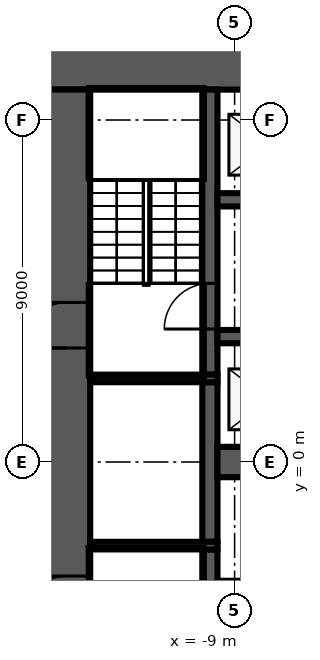
"""IFC4 building model, lengths in metres.
Left out: names, types, materials, properties, quantities, classifications, styles, units other than length and angle.
Written with IfcOpenShell. Run it as: python <this file> out.ifc"""

import sys

from ifc_helpers import new_model, si_unit, direction, frame, frame_2d, origin, place, context, subcontext, project, spatial, rectangle, extrude, element, fill, save


model = new_model("IFC4")
c1 = context("Model", 3, precision=1e-05, world=origin(), true_north=direction((0.0, 1.0)))
c2 = subcontext(c1, "Body", "Model", "MODEL_VIEW")
j1 = project(units=[si_unit("LENGTHUNIT", "METRE"), si_unit("PLANEANGLEUNIT", "RADIAN")], contexts=[c1])
p1 = place(None, origin())
s1 = spatial("IfcSite", under=j1, at=p1, CompositionType="ELEMENT")
p2 = place(p1, origin())
s2 = spatial("IfcBuilding", under=s1, at=p2, CompositionType="ELEMENT")
p3 = place(p2, origin())
s3 = spatial("IfcBuildingStorey", under=s2, at=p3, CompositionType="ELEMENT", Elevation=0.0)
p4 = place(p3, frame((-14.0, 10.4, 0.0), z_axis=(0.0, 0.0, 1.0), x_axis=(1.0, 0.0, 0.0)))
e1 = element("IfcWall", 1, at=p4, inside=s3, PredefinedType="SHEAR", context=c2, shape_type="SweptSolid", body=[
    extrude(rectangle(XDim=28.0, YDim=1.2, at=frame_2d((14.0, 0.0))), origin(), (0.0, 0.0, 1.0), 8.55),
])
p5 = place(p4, frame((15.9, 0.0, 0.0)))
e2 = element("IfcOpeningElement", 2, at=p5, cuts=e1, PredefinedType="OPENING", context=c2, shape_type="SweptSolid", body=[
    extrude(rectangle(XDim=1.6, YDim=2.1, at=frame_2d((0.8, 1.05))), frame((0.0, 0.61, 0.0), z_axis=(0.0, -1.0, 0.0), x_axis=(1.0, 0.0, 0.0)), (0.0, 0.0, 1.0), 1.22),
])
p6 = place(p3, frame((-13.4, -9.8, 0.0), z_axis=(0.0, 0.0, 1.0), x_axis=(0.0, 1.0, 0.0)))
e3 = element("IfcWall", 3, at=p6, inside=s3, PredefinedType="SHEAR", context=c2, shape_type="SweptSolid", body=[
    extrude(rectangle(XDim=19.6, YDim=1.2, at=frame_2d((9.8, 0.0))), origin(), (0.0, 0.0, 1.0), 8.55),
])
p7 = place(p6, frame((12.8, 0.0, 0.0)))
e4 = element("IfcOpeningElement", 4, at=p7, cuts=e3, PredefinedType="OPENING", context=c2, shape_type="SweptSolid", body=[
    extrude(rectangle(XDim=1.2, YDim=2.1, at=frame_2d((0.6, 1.05))), frame((0.0, 0.61, 0.0), z_axis=(0.0, -1.0, 0.0), x_axis=(1.0, 0.0, 0.0)), (0.0, 0.0, 1.0), 1.22),
])
p8 = place(p6, frame((5.6, 0.0, 0.0)))
e5 = element("IfcOpeningElement", 5, at=p8, cuts=e3, PredefinedType="OPENING", context=c2, shape_type="SweptSolid", body=[
    extrude(rectangle(XDim=1.2, YDim=2.1, at=frame_2d((0.6, 1.05))), frame((0.0, 0.61, 0.0), z_axis=(0.0, -1.0, 0.0), x_axis=(1.0, 0.0, 0.0)), (0.0, 0.0, 1.0), 1.22),
])
p9 = place(p3, frame((-9.65, -9.8, 0.0), z_axis=(0.0, 0.0, 1.0), x_axis=(0.0, 1.0, 0.0)))
e6 = element("IfcWall", 6, at=p9, inside=s3, PredefinedType="SHEAR", context=c2, shape_type="SweptSolid", body=[
    extrude(rectangle(XDim=7.5, YDim=0.4, at=frame_2d((3.75, 0.0))), origin(), (0.0, 0.0, 1.0), 8.55),
])
p10 = place(p9, frame((5.1, 0.0, 0.0)))
e7 = element("IfcOpeningElement", 7, at=p10, cuts=e6, PredefinedType="OPENING", context=c2, shape_type="SweptSolid", body=[
    extrude(rectangle(XDim=1.2, YDim=2.1, at=frame_2d((0.6, 1.05))), frame((0.0, 0.21, 0.0), z_axis=(0.0, -1.0, 0.0), x_axis=(1.0, 0.0, 0.0)), (0.0, 0.0, 1.0), 0.42),
])
p11 = place(p3, frame((-9.65, -2.1, 0.0), z_axis=(0.0, 0.0, 1.0), x_axis=(0.0, 1.0, 0.0)))
e8 = element("IfcWall", 8, at=p11, inside=s3, PredefinedType="SHEAR", context=c2, shape_type="SweptSolid", body=[
    extrude(rectangle(XDim=4.2, YDim=0.4, at=frame_2d((2.1, 0.0))), origin(), (0.0, 0.0, 1.0), 8.55),
])
p12 = place(p3, frame((-9.65, 2.3, 0.0), z_axis=(0.0, 0.0, 1.0), x_axis=(0.0, 1.0, 0.0)))
e9 = element("IfcWall", 9, at=p12, inside=s3, PredefinedType="SHEAR", context=c2, shape_type="SweptSolid", body=[
    extrude(rectangle(XDim=7.5, YDim=0.4, at=frame_2d((3.75, 0.0))), origin(), (0.0, 0.0, 1.0), 8.55),
])
p13 = place(p12, frame((1.2, 0.0, 0.0)))
e10 = element("IfcOpeningElement", 10, at=p13, cuts=e9, PredefinedType="OPENING", context=c2, shape_type="SweptSolid", body=[
    extrude(rectangle(XDim=1.2, YDim=2.1, at=frame_2d((0.6, 1.05))), frame((0.0, 0.21, 0.0), z_axis=(0.0, -1.0, 0.0), x_axis=(1.0, 0.0, 0.0)), (0.0, 0.0, 1.0), 0.42),
])
for number, where, z_axis, x_axis in (
    (11, (-9.45, 2.2, 0.0), (0.0, 0.0, 1.0), (-1.0, 0.0, 0.0)),
    (12, (-9.45, -2.2, 0.0), (0.0, 0.0, 1.0), (-1.0, 0.0, 0.0)),
):
    element("IfcWall", number, at=place(p3, frame(where, z_axis=z_axis, x_axis=x_axis)), inside=s3, PredefinedType="SHEAR", context=c2, shape_type="SweptSolid", body=[
        extrude(rectangle(XDim=3.35, YDim=0.2, at=frame_2d((1.675, 0.0))), origin(), (0.0, 0.0, 1.0), 8.55),
    ])
p14 = place(p3, frame((-9.45, 6.9, 0.0), z_axis=(0.0, 0.0, 1.0), x_axis=(1.0, 0.0, 0.0)))
e13 = element("IfcWall", 13, at=p14, inside=s3, PredefinedType="SHEAR", context=c2, shape_type="SweptSolid", body=[
    extrude(rectangle(XDim=18.9, YDim=0.35, at=frame_2d((9.45, 0.0))), origin(), (0.0, 0.0, 1.0), 8.55),
])
p15 = place(p14, frame((0.8, 0.0, 0.0)))
e14 = element("IfcOpeningElement", 14, at=p15, cuts=e13, PredefinedType="OPENING", context=c2, shape_type="SweptSolid", body=[
    extrude(rectangle(XDim=1.1, YDim=2.1, at=frame_2d((0.55, 1.05))), frame((0.0, 0.185, 0.0), z_axis=(0.0, -1.0, 0.0), x_axis=(1.0, 0.0, 0.0)), (0.0, 0.0, 1.0), 0.37),
])
p16 = place(p14, frame((3.5, 0.0, 0.0)))
e15 = element("IfcOpeningElement", 15, at=p16, cuts=e13, PredefinedType="OPENING", context=c2, shape_type="SweptSolid", body=[
    extrude(rectangle(XDim=1.1, YDim=2.1, at=frame_2d((0.55, 1.05))), frame((0.0, 0.185, 0.0), z_axis=(0.0, -1.0, 0.0), x_axis=(1.0, 0.0, 0.0)), (0.0, 0.0, 1.0), 0.37),
])
p17 = place(p14, frame((6.2, 0.0, 0.0)))
e16 = element("IfcOpeningElement", 16, at=p17, cuts=e13, PredefinedType="OPENING", context=c2, shape_type="SweptSolid", body=[
    extrude(rectangle(XDim=1.1, YDim=2.1, at=frame_2d((0.55, 1.05))), frame((0.0, 0.185, 0.0), z_axis=(0.0, -1.0, 0.0), x_axis=(1.0, 0.0, 0.0)), (0.0, 0.0, 1.0), 0.37),
])
p18 = place(p14, frame((8.9, 0.0, 0.0)))
e17 = element("IfcOpeningElement", 17, at=p18, cuts=e13, PredefinedType="OPENING", context=c2, shape_type="SweptSolid", body=[
    extrude(rectangle(XDim=1.1, YDim=2.1, at=frame_2d((0.55, 1.05))), frame((0.0, 0.185, 0.0), z_axis=(0.0, -1.0, 0.0), x_axis=(1.0, 0.0, 0.0)), (0.0, 0.0, 1.0), 0.37),
])
p19 = place(p14, frame((11.55, 0.0, 0.0)))
e18 = element("IfcOpeningElement", 18, at=p19, cuts=e13, PredefinedType="OPENING", context=c2, shape_type="SweptSolid", body=[
    extrude(rectangle(XDim=1.2, YDim=2.1, at=frame_2d((0.6, 1.05))), frame((0.0, 0.185, 0.0), z_axis=(0.0, -1.0, 0.0), x_axis=(1.0, 0.0, 0.0)), (0.0, 0.0, 1.0), 0.37),
])
p20 = place(p14, frame((14.3, 0.0, 0.0)))
e19 = element("IfcOpeningElement", 19, at=p20, cuts=e13, PredefinedType="OPENING", context=c2, shape_type="SweptSolid", body=[
    extrude(rectangle(XDim=1.1, YDim=2.1, at=frame_2d((0.55, 1.05))), frame((0.0, 0.185, 0.0), z_axis=(0.0, -1.0, 0.0), x_axis=(1.0, 0.0, 0.0)), (0.0, 0.0, 1.0), 0.37),
])
p21 = place(p14, frame((17.0, 0.0, 0.0)))
e20 = element("IfcOpeningElement", 20, at=p21, cuts=e13, PredefinedType="OPENING", context=c2, shape_type="SweptSolid", body=[
    extrude(rectangle(XDim=1.1, YDim=2.1, at=frame_2d((0.55, 1.05))), frame((0.0, 0.185, 0.0), z_axis=(0.0, -1.0, 0.0), x_axis=(1.0, 0.0, 0.0)), (0.0, 0.0, 1.0), 0.37),
])
p22 = place(p3, frame((9.45, 3.3, 0.0), z_axis=(0.0, 0.0, 1.0), x_axis=(-1.0, 0.0, 0.0)))
e21 = element("IfcWall", 21, at=p22, inside=s3, PredefinedType="SHEAR", context=c2, shape_type="SweptSolid", body=[
    extrude(rectangle(XDim=18.9, YDim=0.35, at=frame_2d((9.45, 0.0))), origin(), (0.0, 0.0, 1.0), 8.55),
])
p23 = place(p22, frame((0.9, 0.0, 0.0)))
e22 = element("IfcOpeningElement", 22, at=p23, cuts=e21, PredefinedType="OPENING", context=c2, shape_type="SweptSolid", body=[
    extrude(rectangle(XDim=0.9, YDim=2.1, at=frame_2d((0.45, 1.05))), frame((0.0, 0.185, 0.0), z_axis=(0.0, -1.0, 0.0), x_axis=(1.0, 0.0, 0.0)), (0.0, 0.0, 1.0), 0.37),
])
p24 = place(p22, frame((17.0, 0.0, 0.0)))
e23 = element("IfcOpeningElement", 23, at=p24, cuts=e21, PredefinedType="OPENING", context=c2, shape_type="SweptSolid", body=[
    extrude(rectangle(XDim=1.1, YDim=2.1, at=frame_2d((0.55, 1.05))), frame((0.0, 0.185, 0.0), z_axis=(0.0, -1.0, 0.0), x_axis=(1.0, 0.0, 0.0)), (0.0, 0.0, 1.0), 0.37),
])
p25 = place(p22, frame((14.3, 0.0, 0.0)))
e24 = element("IfcOpeningElement", 24, at=p25, cuts=e21, PredefinedType="OPENING", context=c2, shape_type="SweptSolid", body=[
    extrude(rectangle(XDim=1.1, YDim=2.1, at=frame_2d((0.55, 1.05))), frame((0.0, 0.185, 0.0), z_axis=(0.0, -1.0, 0.0), x_axis=(1.0, 0.0, 0.0)), (0.0, 0.0, 1.0), 0.37),
])
p26 = place(p22, frame((11.6, 0.0, 0.0)))
e25 = element("IfcOpeningElement", 25, at=p26, cuts=e21, PredefinedType="OPENING", context=c2, shape_type="SweptSolid", body=[
    extrude(rectangle(XDim=1.1, YDim=2.1, at=frame_2d((0.55, 1.05))), frame((0.0, 0.185, 0.0), z_axis=(0.0, -1.0, 0.0), x_axis=(1.0, 0.0, 0.0)), (0.0, 0.0, 1.0), 0.37),
])
p27 = place(p22, frame((8.9, 0.0, 0.0)))
e26 = element("IfcOpeningElement", 26, at=p27, cuts=e21, PredefinedType="OPENING", context=c2, shape_type="SweptSolid", body=[
    extrude(rectangle(XDim=1.1, YDim=2.1, at=frame_2d((0.55, 1.05))), frame((0.0, 0.185, 0.0), z_axis=(0.0, -1.0, 0.0), x_axis=(1.0, 0.0, 0.0)), (0.0, 0.0, 1.0), 0.37),
])
p28 = place(p22, frame((6.2, 0.0, 0.0)))
e27 = element("IfcOpeningElement", 27, at=p28, cuts=e21, PredefinedType="OPENING", context=c2, shape_type="SweptSolid", body=[
    extrude(rectangle(XDim=1.1, YDim=2.1, at=frame_2d((0.55, 1.05))), frame((0.0, 0.185, 0.0), z_axis=(0.0, -1.0, 0.0), x_axis=(1.0, 0.0, 0.0)), (0.0, 0.0, 1.0), 0.37),
])
p29 = place(p22, frame((3.5, 0.0, 0.0)))
e28 = element("IfcOpeningElement", 28, at=p29, cuts=e21, PredefinedType="OPENING", context=c2, shape_type="SweptSolid", body=[
    extrude(rectangle(XDim=1.1, YDim=2.1, at=frame_2d((0.55, 1.05))), frame((0.0, 0.185, 0.0), z_axis=(0.0, -1.0, 0.0), x_axis=(1.0, 0.0, 0.0)), (0.0, 0.0, 1.0), 0.37),
])
p30 = place(p3, frame((-9.45, 0.0, 0.0), z_axis=(0.0, 0.0, 1.0), x_axis=(1.0, 0.0, 0.0)))
e29 = element("IfcWall", 29, at=p30, inside=s3, PredefinedType="SHEAR", context=c2, shape_type="SweptSolid", body=[
    extrude(rectangle(XDim=18.9, YDim=0.8, at=frame_2d((9.45, 0.0))), origin(), (0.0, 0.0, 1.0), 8.55),
])
p31 = place(p13, origin())
e30 = element("IfcDoor", 30, at=p31, inside=s3, OperationType="SINGLE_SWING_RIGHT", PredefinedType="DOOR", context=c2, shape_type="SweptSolid", body=[
    extrude(rectangle(XDim=1.2, YDim=2.1, at=frame_2d((0.6, 1.05))), frame((0.0, 0.025, 0.0), z_axis=(0.0, -1.0, 0.0), x_axis=(1.0, 0.0, 0.0)), (0.0, 0.0, 1.0), 0.05),
])
fill(e10, e30)
p32 = place(p7, origin())
e31 = element("IfcDoor", 31, at=p32, inside=s3, OperationType="SINGLE_SWING_LEFT", PredefinedType="DOOR", context=c2, shape_type="SweptSolid", body=[
    extrude(rectangle(XDim=1.2, YDim=2.1, at=frame_2d((0.6, 1.05))), frame((0.0, 0.025, 0.0), z_axis=(0.0, -1.0, 0.0), x_axis=(1.0, 0.0, 0.0)), (0.0, 0.0, 1.0), 0.05),
])
fill(e4, e31)
p33 = place(p8, origin())
e32 = element("IfcDoor", 32, at=p33, inside=s3, OperationType="SINGLE_SWING_LEFT", PredefinedType="DOOR", context=c2, shape_type="SweptSolid", body=[
    extrude(rectangle(XDim=1.2, YDim=2.1, at=frame_2d((0.6, 1.05))), frame((0.0, 0.025, 0.0), z_axis=(0.0, -1.0, 0.0), x_axis=(1.0, 0.0, 0.0)), (0.0, 0.0, 1.0), 0.05),
])
fill(e5, e32)
save(model, sys.argv[1])
